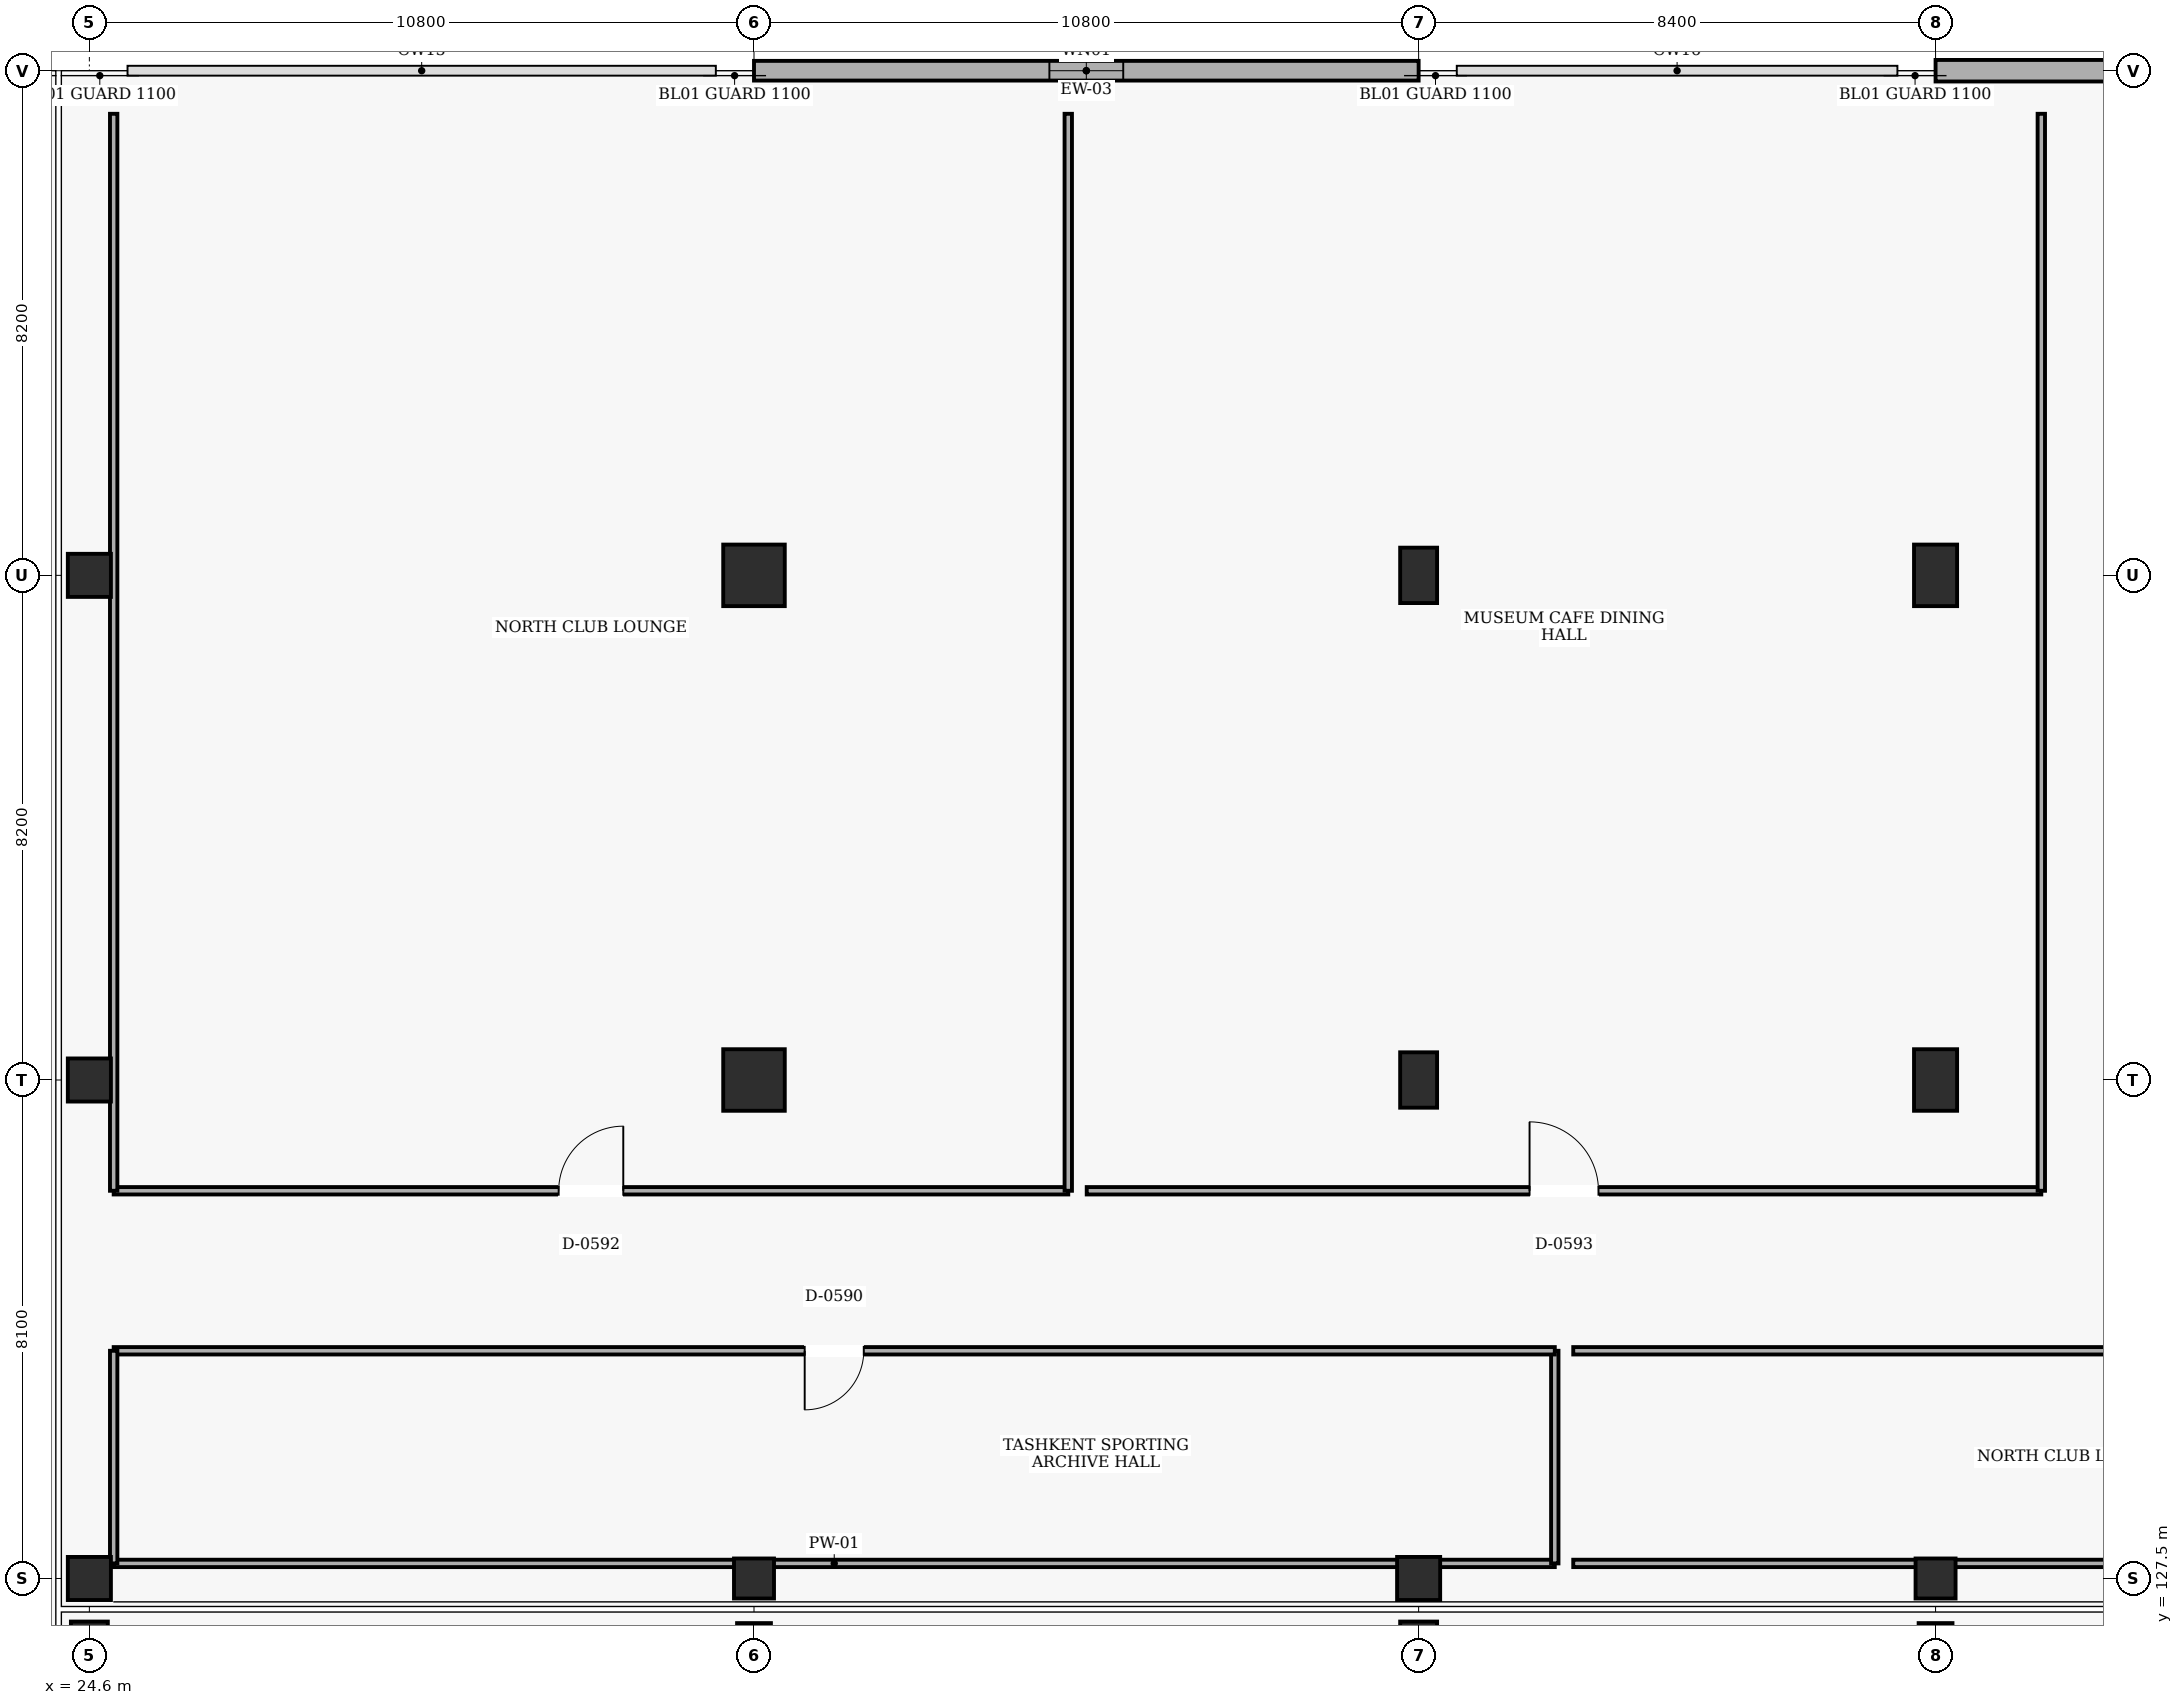
"""IFC4 building model, lengths in metres.
Left out: names, types, materials, properties, quantities, classifications, styles, units other than length and angle.
Written with IfcOpenShell. Run it as: python <this file> out.ifc"""

import sys

from ifc_helpers import new_model, si_unit, direction, frame, frame_2d, origin, origin_2d, place, context, subcontext, project, spatial, rectangle, extrude, element, fill, save


model = new_model("IFC4")
c1 = context("Model", 3, precision=1e-05, world=origin(), true_north=direction((0.0, 1.0)))
c2 = subcontext(c1, "Body", "Model", "MODEL_VIEW")
j1 = project(units=[si_unit("LENGTHUNIT", "METRE"), si_unit("PLANEANGLEUNIT", "RADIAN")], contexts=[c1])
p1 = place(None, origin())
s1 = spatial("IfcSite", under=j1, at=p1, CompositionType="ELEMENT")
p2 = place(p1, origin())
s2 = spatial("IfcBuilding", under=s1, at=p2, CompositionType="ELEMENT")
p3 = place(p2, frame((0.0, 0.0, 10.2)))
s3 = spatial("IfcBuildingStorey", under=s2, at=p3, CompositionType="ELEMENT", Elevation=10.2)
p4 = place(p3, frame((24.6, 126.5, 0.0), z_axis=(0.0, 0.0, 1.0), x_axis=(1.0, 0.0, 0.0)))
e1 = element("IfcColumn", 1, at=p4, inside=s3, PredefinedType="COLUMN", context=c2, shape_type="SweptSolid", body=[
    extrude(rectangle(XDim=0.6, YDim=0.6, at=origin_2d()), origin(), (0.0, 0.0, 1.0), 4.8),
])
for number, where, z_axis, x_axis in (
    (2, (24.6, 127.5, 0.0), (0.0, 0.0, 1.0), (1.0, 0.0, 0.0)),
    (3, (24.6, 135.6, 0.0), (0.0, 0.0, 1.0), (1.0, 0.0, 0.0)),
    (4, (24.6, 143.8, 0.0), (0.0, 0.0, 1.0), (1.0, 0.0, 0.0)),
):
    element("IfcColumn", number, at=place(p3, frame(where, z_axis=z_axis, x_axis=x_axis)), inside=s3, PredefinedType="COLUMN", context=c2, shape_type="SweptSolid", body=[
        extrude(rectangle(XDim=0.7, YDim=0.7, at=origin_2d()), origin(), (0.0, 0.0, 1.0), 4.8),
    ])
p5 = place(p3, frame((35.4, 126.5, 0.0), z_axis=(0.0, 0.0, 1.0), x_axis=(1.0, 0.0, 0.0)))
e5 = element("IfcColumn", 5, at=p5, inside=s3, PredefinedType="COLUMN", context=c2, shape_type="SweptSolid", body=[
    extrude(rectangle(XDim=0.55, YDim=0.55, at=origin_2d()), origin(), (0.0, 0.0, 1.0), 4.8),
])
p6 = place(p3, frame((35.4, 127.5, 0.0), z_axis=(0.0, 0.0, 1.0), x_axis=(1.0, 0.0, 0.0)))
e6 = element("IfcColumn", 6, at=p6, inside=s3, PredefinedType="COLUMN", context=c2, shape_type="SweptSolid", body=[
    extrude(rectangle(XDim=0.65, YDim=0.65, at=origin_2d()), origin(), (0.0, 0.0, 1.0), 4.8),
])
for number, where, z_axis, x_axis in (
    (7, (35.4, 135.6, 0.0), (0.0, 0.0, 1.0), (1.0, 0.0, 0.0)),
    (8, (35.4, 143.8, 0.0), (0.0, 0.0, 1.0), (1.0, 0.0, 0.0)),
):
    element("IfcColumn", number, at=place(p3, frame(where, z_axis=z_axis, x_axis=x_axis)), inside=s3, PredefinedType="COLUMN", context=c2, shape_type="SweptSolid", body=[
        extrude(rectangle(XDim=1.0, YDim=1.0, at=origin_2d()), origin(), (0.0, 0.0, 1.0), 4.8),
    ])
p7 = place(p3, frame((46.2, 126.5, 0.0), z_axis=(0.0, 0.0, 1.0), x_axis=(1.0, 0.0, 0.0)))
e9 = element("IfcColumn", 9, at=p7, inside=s3, PredefinedType="COLUMN", context=c2, shape_type="SweptSolid", body=[
    extrude(rectangle(XDim=0.6, YDim=0.6, at=origin_2d()), origin(), (0.0, 0.0, 1.0), 4.8),
])
p8 = place(p3, frame((46.2, 127.5, 0.0), z_axis=(0.0, 0.0, 1.0), x_axis=(1.0, 0.0, 0.0)))
e10 = element("IfcColumn", 10, at=p8, inside=s3, PredefinedType="COLUMN", context=c2, shape_type="SweptSolid", body=[
    extrude(rectangle(XDim=0.7, YDim=0.7, at=origin_2d()), origin(), (0.0, 0.0, 1.0), 4.8),
])
for number, where, z_axis, x_axis in (
    (11, (46.2, 135.6, 0.0), (0.0, 0.0, 1.0), (1.0, 0.0, 0.0)),
    (12, (46.2, 143.8, 0.0), (0.0, 0.0, 1.0), (1.0, 0.0, 0.0)),
):
    element("IfcColumn", number, at=place(p3, frame(where, z_axis=z_axis, x_axis=x_axis)), inside=s3, PredefinedType="COLUMN", context=c2, shape_type="SweptSolid", body=[
        extrude(rectangle(XDim=0.6, YDim=0.9, at=origin_2d()), origin(), (0.0, 0.0, 1.0), 4.8),
    ])
p9 = place(p3, frame((54.6, 126.5, 0.0), z_axis=(0.0, 0.0, 1.0), x_axis=(1.0, 0.0, 0.0)))
e13 = element("IfcColumn", 13, at=p9, inside=s3, PredefinedType="COLUMN", context=c2, shape_type="SweptSolid", body=[
    extrude(rectangle(XDim=0.55, YDim=0.55, at=origin_2d()), origin(), (0.0, 0.0, 1.0), 4.8),
])
p10 = place(p3, frame((54.6, 127.5, 0.0), z_axis=(0.0, 0.0, 1.0), x_axis=(1.0, 0.0, 0.0)))
e14 = element("IfcColumn", 14, at=p10, inside=s3, PredefinedType="COLUMN", context=c2, shape_type="SweptSolid", body=[
    extrude(rectangle(XDim=0.65, YDim=0.65, at=origin_2d()), origin(), (0.0, 0.0, 1.0), 4.8),
])
for number, where, z_axis, x_axis in (
    (15, (54.6, 135.6, 0.0), (0.0, 0.0, 1.0), (1.0, 0.0, 0.0)),
    (16, (54.6, 143.8, 0.0), (0.0, 0.0, 1.0), (1.0, 0.0, 0.0)),
):
    element("IfcColumn", number, at=place(p3, frame(where, z_axis=z_axis, x_axis=x_axis)), inside=s3, PredefinedType="COLUMN", context=c2, shape_type="SweptSolid", body=[
        extrude(rectangle(XDim=0.7, YDim=1.0, at=origin_2d()), origin(), (0.0, 0.0, 1.0), 4.8),
    ])
p11 = place(p3, frame((35.4, 152.0, 0.0), z_axis=(0.0, 0.0, 1.0), x_axis=(1.0, 0.0, 0.0)))
e17 = element("IfcWall", 17, at=p11, inside=s3, PredefinedType="SOLIDWALL", context=c2, shape_type="SweptSolid", body=[
    extrude(rectangle(XDim=10.8, YDim=0.32, at=frame_2d((5.4, 0.0))), origin(), (0.0, 0.0, 1.0), 4.48),
])
p12 = place(p11, frame((4.8, 0.0, 0.9)))
e18 = element("IfcOpeningElement", 18, at=p12, cuts=e17, PredefinedType="OPENING", context=c2, shape_type="SweptSolid", body=[
    extrude(rectangle(XDim=1.2, YDim=1.5, at=frame_2d((0.6, 0.75))), frame((0.0, 0.17, 0.0), z_axis=(0.0, -1.0, 0.0), x_axis=(1.0, 0.0, 0.0)), (0.0, 0.0, 1.0), 0.34),
])
p13 = place(p3, frame((54.6, 152.0, 0.0), z_axis=(0.0, 0.0, 1.0), x_axis=(1.0, 0.0, 0.0)))
e19 = element("IfcWall", 19, at=p13, inside=s3, PredefinedType="SOLIDWALL", context=c2, shape_type="SweptSolid", body=[
    extrude(rectangle(XDim=9.0, YDim=0.35, at=frame_2d((4.5, 0.0))), origin(), (0.0, 0.0, 1.0), 4.48),
])
p14 = place(p13, frame((3.8, 0.0, 0.9)))
e20 = element("IfcOpeningElement", 20, at=p14, cuts=e19, PredefinedType="OPENING", context=c2, shape_type="SweptSolid", body=[
    extrude(rectangle(XDim=1.4, YDim=1.5, at=frame_2d((0.7, 0.75))), frame((0.0, 0.185, 0.0), z_axis=(0.0, -1.0, 0.0), x_axis=(1.0, 0.0, 0.0)), (0.0, 0.0, 1.0), 0.37),
])
p15 = place(p3, frame((24.995, 127.745, 0.0), z_axis=(0.0, 0.0, 1.0), x_axis=(1.0, 0.0, 0.0)))
e21 = element("IfcWall", 21, at=p15, inside=s3, PredefinedType="PARTITIONING", context=c2, shape_type="SweptSolid", body=[
    extrude(rectangle(XDim=23.417, YDim=0.12, at=frame_2d((11.709, 0.0))), origin(), (0.0, 0.0, 1.0), 3.76),
])
p16 = place(p3, frame((48.413, 127.745, 0.0), z_axis=(0.0, 0.0, 1.0), x_axis=(0.0, 1.0, 0.0)))
e22 = element("IfcWall", 22, at=p16, inside=s3, PredefinedType="PARTITIONING", context=c2, shape_type="SweptSolid", body=[
    extrude(rectangle(XDim=3.455, YDim=0.12, at=frame_2d((1.728, 0.0))), origin(), (0.0, 0.0, 1.0), 4.48),
])
p17 = place(p3, frame((48.413, 131.2, 0.0), z_axis=(0.0, 0.0, 1.0), x_axis=(-1.0, 0.0, 0.0)))
e23 = element("IfcWall", 23, at=p17, inside=s3, PredefinedType="PARTITIONING", context=c2, shape_type="SweptSolid", body=[
    extrude(rectangle(XDim=23.417, YDim=0.12, at=frame_2d((11.709, 0.0))), origin(), (0.0, 0.0, 1.0), 4.48),
])
p18 = place(p17, frame((11.229, 0.0, 0.0)))
e24 = element("IfcOpeningElement", 24, at=p18, cuts=e23, PredefinedType="OPENING", context=c2, shape_type="SweptSolid", body=[
    extrude(rectangle(XDim=0.96, YDim=2.1, at=frame_2d((0.48, 1.05))), frame((0.0, 0.07, 0.0), z_axis=(0.0, -1.0, 0.0), x_axis=(1.0, 0.0, 0.0)), (0.0, 0.0, 1.0), 0.14),
])
p19 = place(p3, frame((24.995, 131.2, 0.0), z_axis=(0.0, 0.0, 1.0), x_axis=(0.0, -1.0, 0.0)))
e25 = element("IfcWall", 25, at=p19, inside=s3, PredefinedType="PARTITIONING", context=c2, shape_type="SweptSolid", body=[
    extrude(rectangle(XDim=3.455, YDim=0.12, at=frame_2d((1.728, 0.0))), origin(), (0.0, 0.0, 1.0), 3.86),
])
p20 = place(p3, frame((48.712, 127.745, 0.0), z_axis=(0.0, 0.0, 1.0), x_axis=(1.0, 0.0, 0.0)))
e26 = element("IfcWall", 26, at=p20, inside=s3, PredefinedType="PARTITIONING", context=c2, shape_type="SweptSolid", body=[
    extrude(rectangle(XDim=23.417, YDim=0.12, at=frame_2d((11.709, 0.0))), origin(), (0.0, 0.0, 1.0), 3.86),
])
p21 = place(p3, frame((72.13, 131.2, 0.0), z_axis=(0.0, 0.0, 1.0), x_axis=(-1.0, 0.0, 0.0)))
e27 = element("IfcWall", 27, at=p21, inside=s3, PredefinedType="PARTITIONING", context=c2, shape_type="SweptSolid", body=[
    extrude(rectangle(XDim=23.417, YDim=0.12, at=frame_2d((11.709, 0.0))), origin(), (0.0, 0.0, 1.0), 4.48),
])
p22 = place(p21, frame((11.209, 0.0, 0.0)))
e28 = element("IfcOpeningElement", 28, at=p22, cuts=e27, PredefinedType="OPENING", context=c2, shape_type="SweptSolid", body=[
    extrude(rectangle(XDim=1.0, YDim=2.1, at=frame_2d((0.5, 1.05))), frame((0.0, 0.07, 0.0), z_axis=(0.0, -1.0, 0.0), x_axis=(1.0, 0.0, 0.0)), (0.0, 0.0, 1.0), 0.14),
])
p23 = place(p3, frame((24.995, 133.8, 0.0), z_axis=(0.0, 0.0, 1.0), x_axis=(1.0, 0.0, 0.0)))
e29 = element("IfcWall", 29, at=p23, inside=s3, PredefinedType="PARTITIONING", context=c2, shape_type="SweptSolid", body=[
    extrude(rectangle(XDim=15.511, YDim=0.12, at=frame_2d((7.756, 0.0))), origin(), (0.0, 0.0, 1.0), 4.48),
])
p24 = place(p23, frame((7.231, 0.0, 0.0)))
e30 = element("IfcOpeningElement", 30, at=p24, cuts=e29, PredefinedType="OPENING", context=c2, shape_type="SweptSolid", body=[
    extrude(rectangle(XDim=1.05, YDim=2.15, at=frame_2d((0.525, 1.075))), frame((0.0, 0.07, 0.0), z_axis=(0.0, -1.0, 0.0), x_axis=(1.0, 0.0, 0.0)), (0.0, 0.0, 1.0), 0.14),
])
p25 = place(p3, frame((40.507, 133.8, 0.0), z_axis=(0.0, 0.0, 1.0), x_axis=(0.0, 1.0, 0.0)))
e31 = element("IfcWall", 31, at=p25, inside=s3, PredefinedType="PARTITIONING", context=c2, shape_type="SweptSolid", body=[
    extrude(rectangle(XDim=17.5, YDim=0.12, at=frame_2d((8.75, 0.0))), origin(), (0.0, 0.0, 1.0), 4.48),
])
p26 = place(p3, frame((24.995, 151.3, 0.0), z_axis=(0.0, 0.0, 1.0), x_axis=(0.0, -1.0, 0.0)))
e32 = element("IfcWall", 32, at=p26, inside=s3, PredefinedType="PARTITIONING", context=c2, shape_type="SweptSolid", body=[
    extrude(rectangle(XDim=17.5, YDim=0.12, at=frame_2d((8.75, 0.0))), origin(), (0.0, 0.0, 1.0), 3.86),
])
p27 = place(p3, frame((40.807, 133.8, 0.0), z_axis=(0.0, 0.0, 1.0), x_axis=(1.0, 0.0, 0.0)))
e33 = element("IfcWall", 33, at=p27, inside=s3, PredefinedType="PARTITIONING", context=c2, shape_type="SweptSolid", body=[
    extrude(rectangle(XDim=15.512, YDim=0.12, at=frame_2d((7.756, 0.0))), origin(), (0.0, 0.0, 1.0), 4.48),
])
p28 = place(p27, frame((7.196, 0.0, 0.0)))
e34 = element("IfcOpeningElement", 34, at=p28, cuts=e33, PredefinedType="OPENING", context=c2, shape_type="SweptSolid", body=[
    extrude(rectangle(XDim=1.12, YDim=2.15, at=frame_2d((0.56, 1.075))), frame((0.0, 0.07, 0.0), z_axis=(0.0, -1.0, 0.0), x_axis=(1.0, 0.0, 0.0)), (0.0, 0.0, 1.0), 0.14),
])
p29 = place(p3, frame((56.318, 133.8, 0.0), z_axis=(0.0, 0.0, 1.0), x_axis=(0.0, 1.0, 0.0)))
e35 = element("IfcWall", 35, at=p29, inside=s3, PredefinedType="PARTITIONING", context=c2, shape_type="SweptSolid", body=[
    extrude(rectangle(XDim=17.5, YDim=0.12, at=frame_2d((8.75, 0.0))), origin(), (0.0, 0.0, 1.0), 4.48),
])
p30 = place(p12, origin())
e36 = element("IfcWindow", 36, at=p30, inside=s3, PartitioningType="SINGLE_PANEL", PredefinedType="WINDOW", context=c2, shape_type="SweptSolid", body=[
    extrude(rectangle(XDim=1.2, YDim=1.5, at=frame_2d((0.6, 0.75))), frame((0.0, 0.03, 0.0), z_axis=(0.0, -1.0, 0.0), x_axis=(1.0, 0.0, 0.0)), (0.0, 0.0, 1.0), 0.06),
])
fill(e18, e36)
p31 = place(p18, origin())
e37 = element("IfcDoor", 37, at=p31, inside=s3, OperationType="SINGLE_SWING_RIGHT", PredefinedType="DOOR", context=c2, shape_type="SweptSolid", body=[
    extrude(rectangle(XDim=0.96, YDim=2.1, at=frame_2d((0.48, 1.05))), frame((0.0, 0.025, 0.0), z_axis=(0.0, -1.0, 0.0), x_axis=(1.0, 0.0, 0.0)), (0.0, 0.0, 1.0), 0.05),
])
fill(e24, e37)
p32 = place(p24, origin())
e38 = element("IfcDoor", 38, at=p32, inside=s3, OperationType="SINGLE_SWING_RIGHT", PredefinedType="DOOR", context=c2, shape_type="SweptSolid", body=[
    extrude(rectangle(XDim=1.05, YDim=2.15, at=frame_2d((0.525, 1.075))), frame((0.0, 0.025, 0.0), z_axis=(0.0, -1.0, 0.0), x_axis=(1.0, 0.0, 0.0)), (0.0, 0.0, 1.0), 0.05),
])
fill(e30, e38)
p33 = place(p28, origin())
e39 = element("IfcDoor", 39, at=p33, inside=s3, OperationType="SINGLE_SWING_LEFT", PredefinedType="DOOR", context=c2, shape_type="SweptSolid", body=[
    extrude(rectangle(XDim=1.12, YDim=2.15, at=frame_2d((0.56, 1.075))), frame((0.0, 0.025, 0.0), z_axis=(0.0, -1.0, 0.0), x_axis=(1.0, 0.0, 0.0)), (0.0, 0.0, 1.0), 0.05),
])
fill(e34, e39)
save(model, sys.argv[1])
